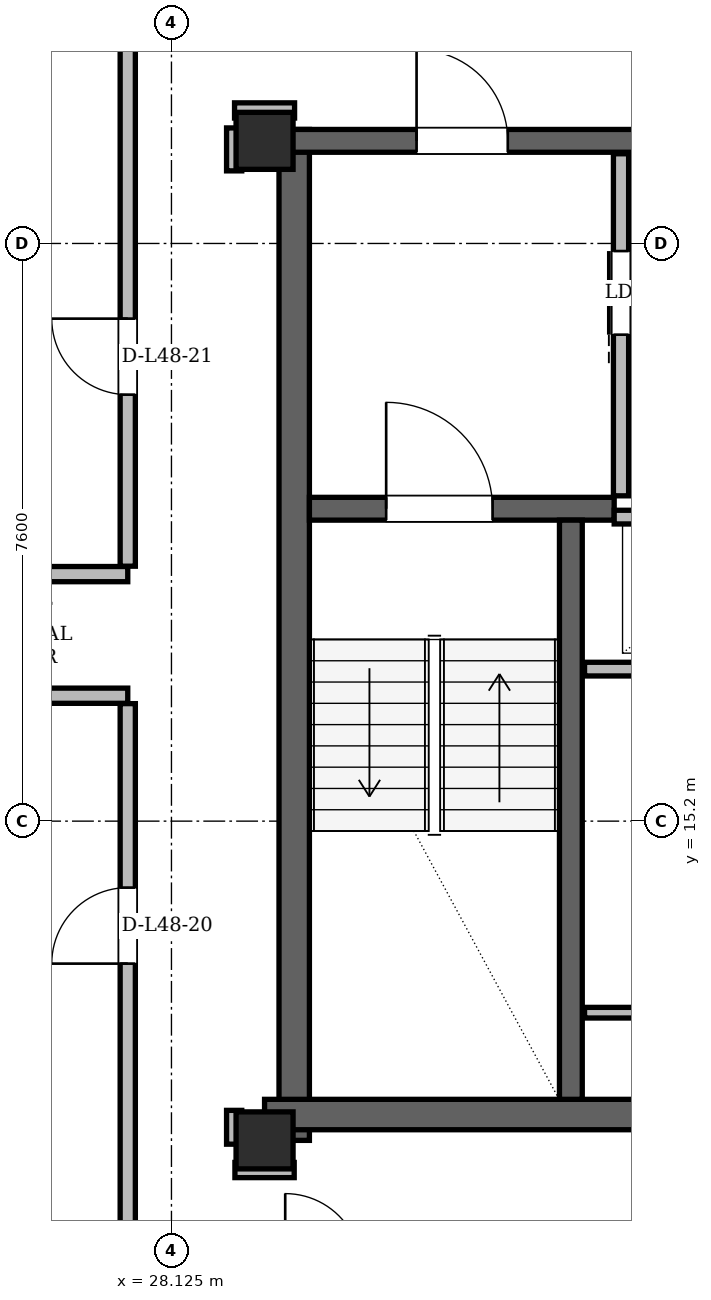
"""IFC4 building model, lengths in metres.
Left out: names, types, materials, properties, quantities, classifications, styles, units other than length and angle.
Written with IfcOpenShell. Run it as: python <this file> out.ifc"""

import sys

from ifc_helpers import new_model, si_unit, direction, frame, frame_2d, origin, origin_2d, place, context, subcontext, project, spatial, rectangle, hollow_rectangle, extrude, element, fill, save


model = new_model("IFC4")
c1 = context("Model", 3, precision=1e-05, world=origin(), true_north=direction((0.0, 1.0)))
c2 = subcontext(c1, "Body", "Model", "MODEL_VIEW")
j1 = project(units=[si_unit("LENGTHUNIT", "METRE"), si_unit("PLANEANGLEUNIT", "RADIAN")], contexts=[c1])
p1 = place(None, origin())
s1 = spatial("IfcSite", under=j1, at=p1, CompositionType="ELEMENT")
p2 = place(p1, origin())
s2 = spatial("IfcBuilding", under=s1, at=p2, CompositionType="ELEMENT")
p3 = place(p2, frame((0.0, 0.0, 181.8)))
s3 = spatial("IfcBuildingStorey", under=s2, at=p3, CompositionType="ELEMENT", Elevation=181.8)
for number, where, z_axis, x_axis in (
    (1, (29.35, 11.0, 0.0), (0.0, 0.0, 1.0), (1.0, 0.0, 0.0)),
    (2, (29.35, 24.15, 0.0), (0.0, 0.0, 1.0), (1.0, 0.0, 0.0)),
):
    element("IfcColumn", number, at=place(p3, frame(where, z_axis=z_axis, x_axis=x_axis)), inside=s3, PredefinedType="COLUMN", context=c2, shape_type="SweptSolid", body=[
        extrude(hollow_rectangle(XDim=0.75, YDim=0.75, WallThickness=0.06, at=origin_2d()), origin(), (0.0, 0.0, 1.0), 3.6),
    ])
p4 = place(p3, frame((29.74, 11.0, 0.0), z_axis=(0.0, 0.0, 1.0), x_axis=(0.0, 1.0, 0.0)))
e3 = element("IfcWall", 3, at=p4, inside=s3, PredefinedType="SHEAR", context=c2, shape_type="SweptSolid", body=[
    extrude(rectangle(XDim=13.3, YDim=0.4, at=frame_2d((6.65, 0.0))), origin(), (0.0, 0.0, 1.0), 3.38),
])
p5 = place(p3, frame((29.35, 11.34, 0.0), z_axis=(0.0, 0.0, 1.0), x_axis=(1.0, 0.0, 0.0)))
e4 = element("IfcWall", 4, at=p5, inside=s3, PredefinedType="SHEAR", context=c2, shape_type="SweptSolid", body=[
    extrude(rectangle(XDim=7.1, YDim=0.4, at=frame_2d((3.55, 0.0))), origin(), (0.0, 0.0, 1.0), 3.38),
])
p6 = place(p3, frame((29.65, 24.15, 0.0), z_axis=(0.0, 0.0, 1.0), x_axis=(1.0, 0.0, 0.0)))
e5 = element("IfcWall", 5, at=p6, inside=s3, PredefinedType="SHEAR", context=c2, shape_type="SweptSolid", body=[
    extrude(rectangle(XDim=15.7, YDim=0.3, at=frame_2d((7.85, 0.0))), origin(), (0.0, 0.0, 1.0), 3.38),
])
p7 = place(p6, frame((1.7, 0.0, 0.0)))
e6 = element("IfcOpeningElement", 6, at=p7, cuts=e5, PredefinedType="OPENING", context=c2, shape_type="SweptSolid", body=[
    extrude(rectangle(XDim=1.2, YDim=2.2, at=frame_2d((0.6, 1.1))), frame((0.0, 0.15, 0.0), z_axis=(0.0, -1.0, 0.0), x_axis=(1.0, 0.0, 0.0)), (0.0, 0.0, 1.0), 0.3),
])
p8 = place(p6, frame((12.8, 0.0, 0.0)))
e7 = element("IfcOpeningElement", 7, at=p8, cuts=e5, PredefinedType="OPENING", context=c2, shape_type="SweptSolid", body=[
    extrude(rectangle(XDim=1.2, YDim=2.2, at=frame_2d((0.6, 1.1))), frame((0.0, 0.15, 0.0), z_axis=(0.0, -1.0, 0.0), x_axis=(1.0, 0.0, 0.0)), (0.0, 0.0, 1.0), 0.3),
])
p9 = place(p6, frame((6.55, 0.0, 0.0)))
e8 = element("IfcOpeningElement", 8, at=p9, cuts=e5, PredefinedType="OPENING", context=c2, shape_type="SweptSolid", body=[
    extrude(rectangle(XDim=0.9, YDim=2.05, at=frame_2d((0.45, 1.025))), frame((0.0, 0.15, 0.0), z_axis=(0.0, -1.0, 0.0), x_axis=(1.0, 0.0, 0.0)), (0.0, 0.0, 1.0), 0.3),
])
p10 = place(p6, frame((8.45, 0.0, 0.0)))
e9 = element("IfcOpeningElement", 9, at=p10, cuts=e5, PredefinedType="OPENING", context=c2, shape_type="SweptSolid", body=[
    extrude(rectangle(XDim=0.9, YDim=2.05, at=frame_2d((0.45, 1.025))), frame((0.0, 0.15, 0.0), z_axis=(0.0, -1.0, 0.0), x_axis=(1.0, 0.0, 0.0)), (0.0, 0.0, 1.0), 0.3),
])
p11 = place(p3, frame((29.94, 19.31, 0.0), z_axis=(0.0, 0.0, 1.0), x_axis=(1.0, 0.0, 0.0)))
e10 = element("IfcWall", 10, at=p11, inside=s3, PredefinedType="SHEAR", context=c2, shape_type="SweptSolid", body=[
    extrude(rectangle(XDim=4.01, YDim=0.3, at=frame_2d((2.005, 0.0))), origin(), (0.0, 0.0, 1.0), 3.38),
])
p12 = place(p11, frame((1.01, 0.0, 0.0)))
e11 = element("IfcOpeningElement", 11, at=p12, cuts=e10, PredefinedType="OPENING", context=c2, shape_type="SweptSolid", body=[
    extrude(rectangle(XDim=1.4, YDim=2.2, at=frame_2d((0.7, 1.1))), frame((0.0, 0.15, 0.0), z_axis=(0.0, -1.0, 0.0), x_axis=(1.0, 0.0, 0.0)), (0.0, 0.0, 1.0), 0.3),
])
p13 = place(p3, frame((33.38, 11.54, 0.0), z_axis=(0.0, 0.0, 1.0), x_axis=(0.0, 1.0, 0.0)))
e12 = element("IfcWall", 12, at=p13, inside=s3, PredefinedType="SHEAR", context=c2, shape_type="SweptSolid", body=[
    extrude(rectangle(XDim=7.62, YDim=0.3, at=frame_2d((3.81, 0.0))), origin(), (0.0, 0.0, 1.0), 3.38),
])
p14 = place(p3, frame((33.461, 43.247, 0.0), z_axis=(0.0, 0.0, 1.0), x_axis=(-0.499997559055, -0.86602681306, 0.0)))
e13 = element("IfcWall", 13, at=p14, inside=s3, PredefinedType="SOLIDWALL", context=c2, shape_type="SweptSolid", body=[
    extrude(rectangle(XDim=36.054, YDim=0.29, at=frame_2d((18.027, 0.0))), origin(), (0.0, 0.0, 1.0), 2.6),
])
p15 = place(p14, frame((6.579, 0.0, 0.0)))
e14 = element("IfcOpeningElement", 14, at=p15, cuts=e13, PredefinedType="OPENING", context=c2, shape_type="SweptSolid", body=[
    extrude(rectangle(XDim=1.5, YDim=2.2, at=frame_2d((0.75, 1.1))), frame((0.0, 0.145, 0.0), z_axis=(0.0, -1.0, 0.0), x_axis=(1.0, 0.0, 0.0)), (0.0, 0.0, 1.0), 0.29),
])
p16 = place(p14, frame((26.519, 0.0, 0.0)))
e15 = element("IfcOpeningElement", 15, at=p16, cuts=e13, PredefinedType="OPENING", context=c2, shape_type="SweptSolid", body=[
    extrude(rectangle(XDim=1.5, YDim=2.2, at=frame_2d((0.75, 1.1))), frame((0.0, 0.145, 0.0), z_axis=(0.0, -1.0, 0.0), x_axis=(1.0, 0.0, 0.0)), (0.0, 0.0, 1.0), 0.29),
])
p17 = place(p14, frame((33.788, 0.0, 0.85)))
e16 = element("IfcOpeningElement", 16, at=p17, cuts=e13, PredefinedType="OPENING", context=c2, shape_type="SweptSolid", body=[
    extrude(rectangle(XDim=1.2, YDim=1.48, at=frame_2d((0.6, 0.74))), frame((0.0, 0.145, 0.0), z_axis=(0.0, -1.0, 0.0), x_axis=(1.0, 0.0, 0.0)), (0.0, 0.0, 1.0), 0.29),
])
p18 = place(p14, frame((18.57, 0.0, 0.85)))
e17 = element("IfcOpeningElement", 17, at=p18, cuts=e13, PredefinedType="OPENING", context=c2, shape_type="SweptSolid", body=[
    extrude(rectangle(XDim=2.0, YDim=1.64, at=frame_2d((1.0, 0.82))), frame((0.0, 0.145, 0.0), z_axis=(0.0, -1.0, 0.0), x_axis=(1.0, 0.0, 0.0)), (0.0, 0.0, 1.0), 0.29),
])
p19 = place(p14, frame((12.794, 0.0, 0.85)))
e18 = element("IfcOpeningElement", 18, at=p19, cuts=e13, PredefinedType="OPENING", context=c2, shape_type="SweptSolid", body=[
    extrude(rectangle(XDim=1.2, YDim=1.48, at=frame_2d((0.6, 0.74))), frame((0.0, 0.145, 0.0), z_axis=(0.0, -1.0, 0.0), x_axis=(1.0, 0.0, 0.0)), (0.0, 0.0, 1.0), 0.29),
])
p20 = place(p14, frame((15.496, 0.0, 0.85)))
e19 = element("IfcOpeningElement", 19, at=p20, cuts=e13, PredefinedType="OPENING", context=c2, shape_type="SweptSolid", body=[
    extrude(rectangle(XDim=1.2, YDim=1.48, at=frame_2d((0.6, 0.74))), frame((0.0, 0.145, 0.0), z_axis=(0.0, -1.0, 0.0), x_axis=(1.0, 0.0, 0.0)), (0.0, 0.0, 1.0), 0.29),
])
p21 = place(p14, frame((1.108, 0.0, 0.85)))
e20 = element("IfcOpeningElement", 20, at=p21, cuts=e13, PredefinedType="OPENING", context=c2, shape_type="SweptSolid", body=[
    extrude(rectangle(XDim=2.0, YDim=1.64, at=frame_2d((1.0, 0.82))), frame((0.0, 0.145, 0.0), z_axis=(0.0, -1.0, 0.0), x_axis=(1.0, 0.0, 0.0)), (0.0, 0.0, 1.0), 0.29),
])
p22 = place(p3, frame((34.04, 19.48, 0.0), z_axis=(0.0, 0.0, 1.0), x_axis=(0.0, 1.0, 0.0)))
e21 = element("IfcWall", 21, at=p22, inside=s3, PredefinedType="PARTITIONING", context=c2, shape_type="SweptSolid", body=[
    extrude(rectangle(XDim=4.5, YDim=0.2, at=frame_2d((2.25, 0.0))), origin(), (0.0, 0.0, 1.0), 3.38),
])
p23 = place(p22, frame((2.12, 0.0, 0.0)))
e22 = element("IfcOpeningElement", 22, at=p23, cuts=e21, PredefinedType="OPENING", context=c2, shape_type="SweptSolid", body=[
    extrude(rectangle(XDim=1.1, YDim=2.2, at=frame_2d((0.55, 1.1))), frame((0.0, 0.1, 0.0), z_axis=(0.0, -1.0, 0.0), x_axis=(1.0, 0.0, 0.0)), (0.0, 0.0, 1.0), 0.2),
])
p24 = place(p3, frame((34.16, 20.86, 0.0), z_axis=(0.0, 0.0, 1.0), x_axis=(1.0, 0.0, 0.0)))
e23 = element("IfcWall", 23, at=p24, inside=s3, PredefinedType="PARTITIONING", context=c2, shape_type="SweptSolid", body=[
    extrude(rectangle(XDim=1.58, YDim=0.18, at=frame_2d((0.79, 0.0))), origin(), (0.0, 0.0, 1.0), 3.38),
])
p25 = place(p3, frame((33.95, 19.2, 0.0), z_axis=(0.0, 0.0, 1.0), x_axis=(1.0, 0.0, 0.0)))
e24 = element("IfcWall", 24, at=p25, inside=s3, PredefinedType="PARTITIONING", context=c2, shape_type="SweptSolid", body=[
    extrude(rectangle(XDim=2.27, YDim=0.18, at=frame_2d((1.135, 0.0))), origin(), (0.0, 0.0, 1.0), 3.38),
])
p26 = place(p3, frame((33.56, 17.2, 0.0), z_axis=(0.0, 0.0, 1.0), x_axis=(1.0, 0.0, 0.0)))
e25 = element("IfcWall", 25, at=p26, inside=s3, PredefinedType="PARTITIONING", context=c2, shape_type="SweptSolid", body=[
    extrude(rectangle(XDim=2.66, YDim=0.18, at=frame_2d((1.33, 0.0))), origin(), (0.0, 0.0, 1.0), 3.38),
])
p27 = place(p3, frame((33.56, 12.68, 0.0), z_axis=(0.0, 0.0, 1.0), x_axis=(1.0, 0.0, 0.0)))
e26 = element("IfcWall", 26, at=p27, inside=s3, PredefinedType="PARTITIONING", context=c2, shape_type="SweptSolid", body=[
    extrude(rectangle(XDim=2.66, YDim=0.14, at=frame_2d((1.33, 0.0))), origin(), (0.0, 0.0, 1.0), 3.38),
])
p28 = place(p3, frame((28.96, 10.61, 0.0), z_axis=(0.0, 0.0, 1.0), x_axis=(1.0, 0.0, 0.0)))
e27 = element("IfcWall", 27, at=p28, inside=s3, PredefinedType="PARTITIONING", context=c2, shape_type="SweptSolid", body=[
    extrude(rectangle(XDim=0.78, YDim=0.2, at=frame_2d((0.39, 0.0))), origin(), (0.0, 0.0, 1.0), 3.38),
])
p29 = place(p3, frame((18.553, 16.85, 0.0), z_axis=(0.0, 0.0, 1.0), x_axis=(1.0, 0.0, 0.0)))
e28 = element("IfcWall", 28, at=p29, inside=s3, PredefinedType="PARTITIONING", context=c2, shape_type="SweptSolid", body=[
    extrude(rectangle(XDim=8.997, YDim=0.2, at=frame_2d((4.499, 0.0))), origin(), (0.0, 0.0, 1.0), 3.38),
])
p30 = place(p3, frame((24.2, 18.45, 0.0), z_axis=(0.0, 0.0, 1.0), x_axis=(1.0, 0.0, 0.0)))
e29 = element("IfcWall", 29, at=p30, inside=s3, PredefinedType="PARTITIONING", context=c2, shape_type="SweptSolid", body=[
    extrude(rectangle(XDim=3.35, YDim=0.2, at=frame_2d((1.675, 0.0))), origin(), (0.0, 0.0, 1.0), 3.38),
])
p31 = place(p3, frame((28.955, 24.55, 0.0), z_axis=(0.0, 0.0, 1.0), x_axis=(1.0, 0.0, 0.0)))
e30 = element("IfcWall", 30, at=p31, inside=s3, PredefinedType="PARTITIONING", context=c2, shape_type="SweptSolid", body=[
    extrude(rectangle(XDim=0.79, YDim=0.2, at=frame_2d((0.395, 0.0))), origin(), (0.0, 0.0, 1.0), 2.842),
])
p32 = place(p3, frame((27.55, 5.178, 0.0), z_axis=(0.0, 0.0, 1.0), x_axis=(0.0, 1.0, 0.0)))
e31 = element("IfcWall", 31, at=p32, inside=s3, PredefinedType="PARTITIONING", context=c2, shape_type="SweptSolid", body=[
    extrude(rectangle(XDim=11.568, YDim=0.2, at=frame_2d((5.784, 0.0))), origin(), (0.0, 0.0, 1.0), 2.842),
])
p33 = place(p32, frame((8.148, 0.0, 0.0)))
e32 = element("IfcOpeningElement", 32, at=p33, cuts=e31, PredefinedType="OPENING", context=c2, shape_type="SweptSolid", body=[
    extrude(rectangle(XDim=1.0, YDim=2.18, at=frame_2d((0.5, 1.09))), frame((0.0, 0.1, 0.0), z_axis=(0.0, -1.0, 0.0), x_axis=(1.0, 0.0, 0.0)), (0.0, 0.0, 1.0), 0.2),
])
p34 = place(p3, frame((27.55, 18.554, 0.0), z_axis=(0.0, 0.0, 1.0), x_axis=(0.0, 1.0, 0.0)))
e33 = element("IfcWall", 33, at=p34, inside=s3, PredefinedType="PARTITIONING", context=c2, shape_type="SweptSolid", body=[
    extrude(rectangle(XDim=14.156, YDim=0.2, at=frame_2d((7.078, 0.0))), origin(), (0.0, 0.0, 1.0), 2.6),
])
p35 = place(p34, frame((2.257, 0.0, 0.0)))
e34 = element("IfcOpeningElement", 34, at=p35, cuts=e33, PredefinedType="OPENING", context=c2, shape_type="SweptSolid", body=[
    extrude(rectangle(XDim=1.0, YDim=2.18, at=frame_2d((0.5, 1.09))), frame((0.0, 0.1, 0.0), z_axis=(0.0, -1.0, 0.0), x_axis=(1.0, 0.0, 0.0)), (0.0, 0.0, 1.0), 0.2),
])
p36 = place(p3, frame((28.95, 10.95, 0.0), z_axis=(0.0, 0.0, 1.0), x_axis=(0.0, 1.0, 0.0)))
e35 = element("IfcWall", 35, at=p36, inside=s3, PredefinedType="PARTITIONING", context=c2, shape_type="SweptSolid", body=[
    extrude(rectangle(XDim=0.445, YDim=0.2, at=frame_2d((0.223, 0.0))), origin(), (0.0, 0.0, 1.0), 2.842),
])
p37 = place(p3, frame((28.95, 23.755, 0.0), z_axis=(0.0, 0.0, 1.0), x_axis=(0.0, 1.0, 0.0)))
e36 = element("IfcWall", 36, at=p37, inside=s3, PredefinedType="PARTITIONING", context=c2, shape_type="SweptSolid", body=[
    extrude(rectangle(XDim=0.565, YDim=0.2, at=frame_2d((0.283, 0.0))), origin(), (0.0, 0.0, 1.0), 3.38),
])
p38 = place(p23, origin())
e37 = element("IfcDoor", 37, at=p38, inside=s3, OperationType="SLIDING_TO_LEFT", PredefinedType="DOOR", context=c2, shape_type="SweptSolid", body=[
    extrude(rectangle(XDim=1.1, YDim=2.2, at=frame_2d((0.55, 1.1))), frame((0.0, 0.025, 0.0), z_axis=(0.0, -1.0, 0.0), x_axis=(1.0, 0.0, 0.0)), (0.0, 0.0, 1.0), 0.05),
])
fill(e22, e37)
p39 = place(p12, origin())
e38 = element("IfcDoor", 38, at=p39, inside=s3, OperationType="SINGLE_SWING_LEFT", PredefinedType="DOOR", context=c2, shape_type="SweptSolid", body=[
    extrude(rectangle(XDim=1.4, YDim=2.2, at=frame_2d((0.7, 1.1))), frame((0.0, 0.025, 0.0), z_axis=(0.0, -1.0, 0.0), x_axis=(1.0, 0.0, 0.0)), (0.0, 0.0, 1.0), 0.05),
])
fill(e11, e38)
p40 = place(p7, origin())
e39 = element("IfcDoor", 39, at=p40, inside=s3, OperationType="SINGLE_SWING_LEFT", PredefinedType="DOOR", context=c2, shape_type="SweptSolid", body=[
    extrude(rectangle(XDim=1.2, YDim=2.2, at=frame_2d((0.6, 1.1))), frame((0.0, 0.025, 0.0), z_axis=(0.0, -1.0, 0.0), x_axis=(1.0, 0.0, 0.0)), (0.0, 0.0, 1.0), 0.05),
])
fill(e6, e39)
p41 = place(p33, origin())
e40 = element("IfcDoor", 40, at=p41, inside=s3, OperationType="SINGLE_SWING_LEFT", PredefinedType="DOOR", context=c2, shape_type="SweptSolid", body=[
    extrude(rectangle(XDim=1.0, YDim=2.18, at=frame_2d((0.5, 1.09))), frame((0.0, 0.025, 0.0), z_axis=(0.0, -1.0, 0.0), x_axis=(1.0, 0.0, 0.0)), (0.0, 0.0, 1.0), 0.05),
])
fill(e32, e40)
p42 = place(p35, origin())
e41 = element("IfcDoor", 41, at=p42, inside=s3, OperationType="SINGLE_SWING_RIGHT", PredefinedType="DOOR", context=c2, shape_type="SweptSolid", body=[
    extrude(rectangle(XDim=1.0, YDim=2.18, at=frame_2d((0.5, 1.09))), frame((0.0, 0.025, 0.0), z_axis=(0.0, -1.0, 0.0), x_axis=(1.0, 0.0, 0.0)), (0.0, 0.0, 1.0), 0.05),
])
fill(e34, e41)
save(model, sys.argv[1])
